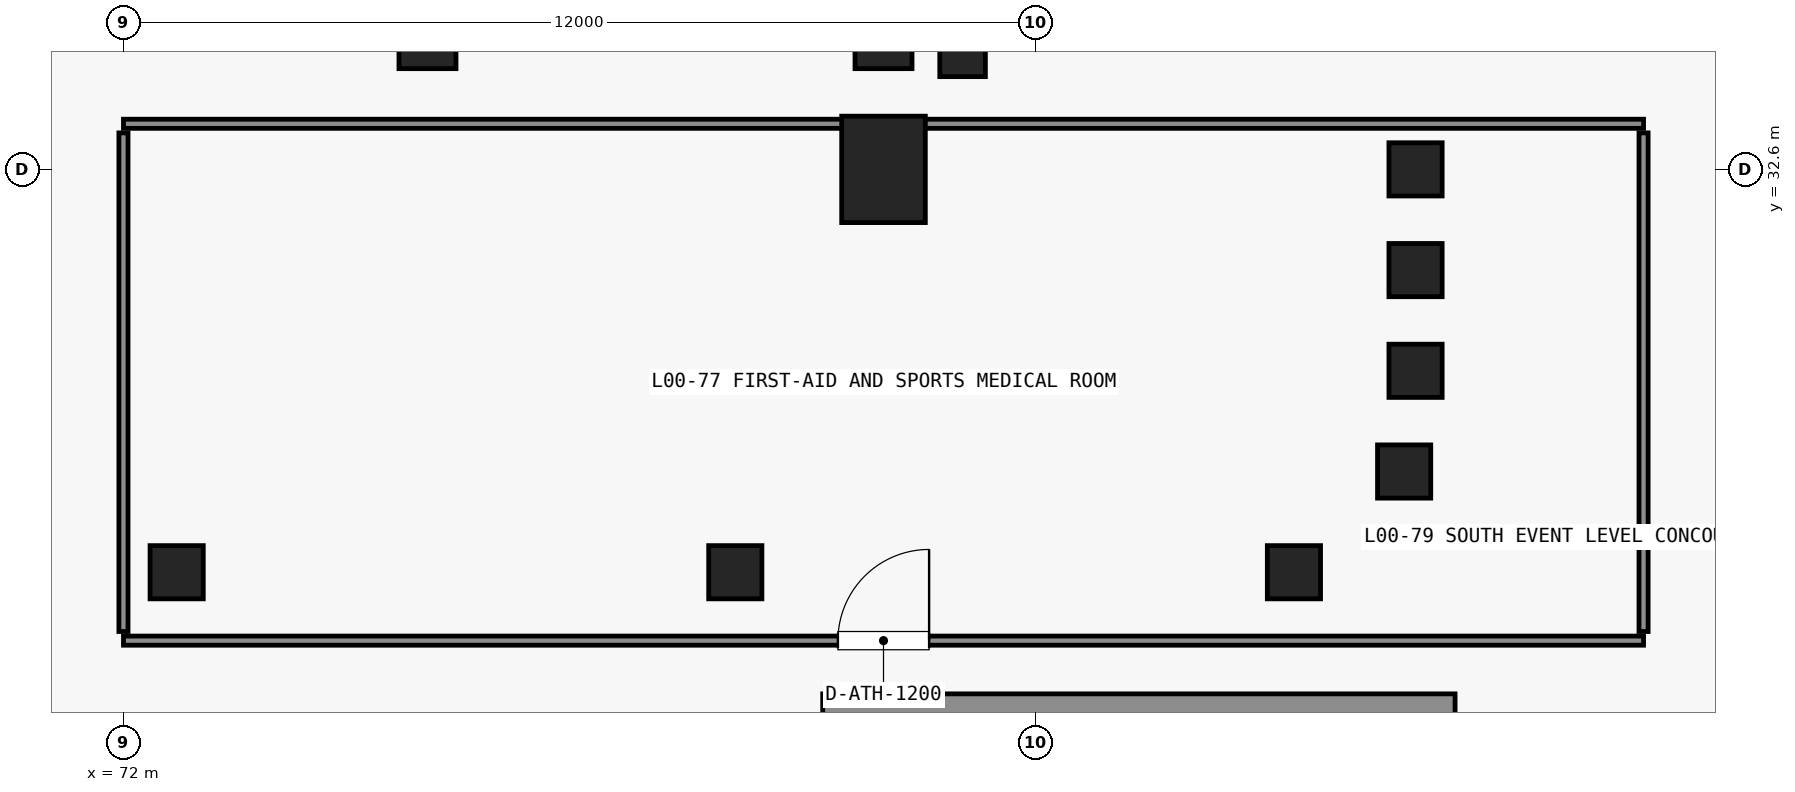
"""IFC4 building model, lengths in metres.
Left out: names, types, materials, properties, quantities, classifications, styles, units other than length and angle.
Written with IfcOpenShell. Run it as: python <this file> out.ifc"""

import sys

from ifc_helpers import new_model, si_unit, direction, frame, frame_2d, origin, origin_2d, place, context, subcontext, project, spatial, rectangle, extrude, element, fill, save


model = new_model("IFC4")
c1 = context("Model", 3, precision=1e-05, world=origin(), true_north=direction((0.0, 1.0)))
c2 = subcontext(c1, "Body", "Model", "MODEL_VIEW")
j1 = project(units=[si_unit("LENGTHUNIT", "METRE"), si_unit("PLANEANGLEUNIT", "RADIAN")], contexts=[c1])
p1 = place(None, origin())
s1 = spatial("IfcSite", under=j1, at=p1, CompositionType="ELEMENT")
p2 = place(p1, origin())
s2 = spatial("IfcBuilding", under=s1, at=p2, CompositionType="ELEMENT")
p3 = place(p2, origin())
s3 = spatial("IfcBuildingStorey", under=s2, at=p3, CompositionType="ELEMENT", Elevation=0.0)
p4 = place(p3, frame((82.0, 32.6, 0.0), z_axis=(0.0, 0.0, 1.0), x_axis=(1.0, 0.0, 0.0)))
e1 = element("IfcColumn", 1, at=p4, inside=s3, PredefinedType="COLUMN", context=c2, shape_type="SweptSolid", body=[
    extrude(rectangle(XDim=1.1, YDim=1.4, at=origin_2d()), origin(), (0.0, 0.0, 1.0), 6.0),
])
p5 = place(p3, frame((81.2, 25.55, 0.0), z_axis=(0.0, 0.0, 1.0), x_axis=(1.0, 0.0, 0.0)))
e2 = element("IfcWall", 2, at=p5, inside=s3, PredefinedType="SHEAR", context=c2, shape_type="SweptSolid", body=[
    extrude(rectangle(XDim=8.32, YDim=0.3, at=frame_2d((4.16, 0.0))), origin(), (0.0, 0.0, 1.0), 6.0),
])
p6 = place(p3, frame((72.7, 27.3, 0.0), z_axis=(0.0, 0.0, 1.0), x_axis=(1.0, 0.0, 0.0)))
e3 = element("IfcColumn", 3, at=p6, inside=s3, PredefinedType="COLUMN", context=c2, shape_type="SweptSolid", body=[
    extrude(rectangle(XDim=0.7, YDim=0.7, at=origin_2d()), origin(), (0.0, 0.0, 1.0), 6.0),
])
p7 = place(p3, frame((76.0, 34.3, 0.0), z_axis=(0.0, 0.0, 1.0), x_axis=(1.0, 0.0, 0.0)))
e4 = element("IfcColumn", 4, at=p7, inside=s3, PredefinedType="COLUMN", context=c2, shape_type="SweptSolid", body=[
    extrude(rectangle(XDim=0.75, YDim=0.75, at=origin_2d()), origin(), (0.0, 0.0, 1.0), 6.0),
])
p8 = place(p3, frame((80.05, 27.3, 0.0), z_axis=(0.0, 0.0, 1.0), x_axis=(1.0, 0.0, 0.0)))
e5 = element("IfcColumn", 5, at=p8, inside=s3, PredefinedType="COLUMN", context=c2, shape_type="SweptSolid", body=[
    extrude(rectangle(XDim=0.7, YDim=0.7, at=origin_2d()), origin(), (0.0, 0.0, 1.0), 6.0),
])
p9 = place(p3, frame((82.0, 34.3, 0.0), z_axis=(0.0, 0.0, 1.0), x_axis=(1.0, 0.0, 0.0)))
e6 = element("IfcColumn", 6, at=p9, inside=s3, PredefinedType="COLUMN", context=c2, shape_type="SweptSolid", body=[
    extrude(rectangle(XDim=0.75, YDim=0.75, at=origin_2d()), origin(), (0.0, 0.0, 1.0), 6.0),
])
for number, where, z_axis, x_axis in (
    (7, (87.4, 27.3, 0.0), (0.0, 0.0, 1.0), (1.0, 0.0, 0.0)),
    (8, (88.85, 28.625, 0.0), (0.0, 0.0, 1.0), (1.0, 0.0, 0.0)),
    (9, (89.0, 29.95, 0.0), (0.0, 0.0, 1.0), (1.0, 0.0, 0.0)),
    (10, (89.0, 31.275, 0.0), (0.0, 0.0, 1.0), (1.0, 0.0, 0.0)),
    (11, (89.0, 32.6, 0.0), (0.0, 0.0, 1.0), (1.0, 0.0, 0.0)),
):
    element("IfcColumn", number, at=place(p3, frame(where, z_axis=z_axis, x_axis=x_axis)), inside=s3, PredefinedType="COLUMN", context=c2, shape_type="SweptSolid", body=[
        extrude(rectangle(XDim=0.7, YDim=0.7, at=origin_2d()), origin(), (0.0, 0.0, 1.0), 6.0),
    ])
p10 = place(p3, frame((83.04, 34.12, 0.0), z_axis=(0.0, 0.0, 1.0), x_axis=(1.0, 0.0, 0.0)))
e12 = element("IfcColumn", 12, at=p10, inside=s3, PredefinedType="COLUMN", context=c2, shape_type="SweptSolid", body=[
    extrude(rectangle(XDim=0.6, YDim=0.6, at=origin_2d()), origin(), (0.0, 0.0, 1.0), 6.0),
])
p11 = place(p3, frame((72.0, 26.4, 0.0), z_axis=(0.0, 0.0, 1.0), x_axis=(1.0, 0.0, 0.0)))
e13 = element("IfcWall", 13, at=p11, inside=s3, PredefinedType="PARTITIONING", context=c2, shape_type="SweptSolid", body=[
    extrude(rectangle(XDim=20.0, YDim=0.12, at=frame_2d((10.0, 0.0))), origin(), (0.0, 0.0, 1.0), 5.64),
])
p12 = place(p11, frame((9.4, 0.0, 0.0)))
e14 = element("IfcOpeningElement", 14, at=p12, cuts=e13, PredefinedType="OPENING", context=c2, shape_type="SweptSolid", body=[
    extrude(rectangle(XDim=1.2, YDim=2.2, at=frame_2d((0.6, 1.1))), frame((0.0, 0.07, 0.0), z_axis=(0.0, -1.0, 0.0), x_axis=(1.0, 0.0, 0.0)), (0.0, 0.0, 1.0), 0.14),
])
p13 = place(p3, frame((72.0, 33.2, 0.0), z_axis=(0.0, 0.0, 1.0), x_axis=(1.0, 0.0, 0.0)))
e15 = element("IfcWall", 15, at=p13, inside=s3, PredefinedType="PARTITIONING", context=c2, shape_type="SweptSolid", body=[
    extrude(rectangle(XDim=20.0, YDim=0.12, at=frame_2d((10.0, 0.0))), origin(), (0.0, 0.0, 1.0), 4.79),
])
for number, where, z_axis, x_axis in (
    (16, (72.0, 26.52, 0.0), (0.0, 0.0, 1.0), (0.0, 1.0, 0.0)),
    (17, (92.0, 26.52, 0.0), (0.0, 0.0, 1.0), (0.0, 1.0, 0.0)),
):
    element("IfcWall", number, at=place(p3, frame(where, z_axis=z_axis, x_axis=x_axis)), inside=s3, PredefinedType="PARTITIONING", context=c2, shape_type="SweptSolid", body=[
        extrude(rectangle(XDim=6.56, YDim=0.12, at=frame_2d((3.28, 0.0))), origin(), (0.0, 0.0, 1.0), 4.79),
    ])
p14 = place(p12, origin())
e18 = element("IfcDoor", 18, at=p14, inside=s3, OperationType="SINGLE_SWING_RIGHT", PredefinedType="DOOR", context=c2, shape_type="SweptSolid", body=[
    extrude(rectangle(XDim=1.2, YDim=2.2, at=frame_2d((0.6, 1.1))), frame((0.0, 0.025, 0.0), z_axis=(0.0, -1.0, 0.0), x_axis=(1.0, 0.0, 0.0)), (0.0, 0.0, 1.0), 0.05),
])
fill(e14, e18)
save(model, sys.argv[1])
